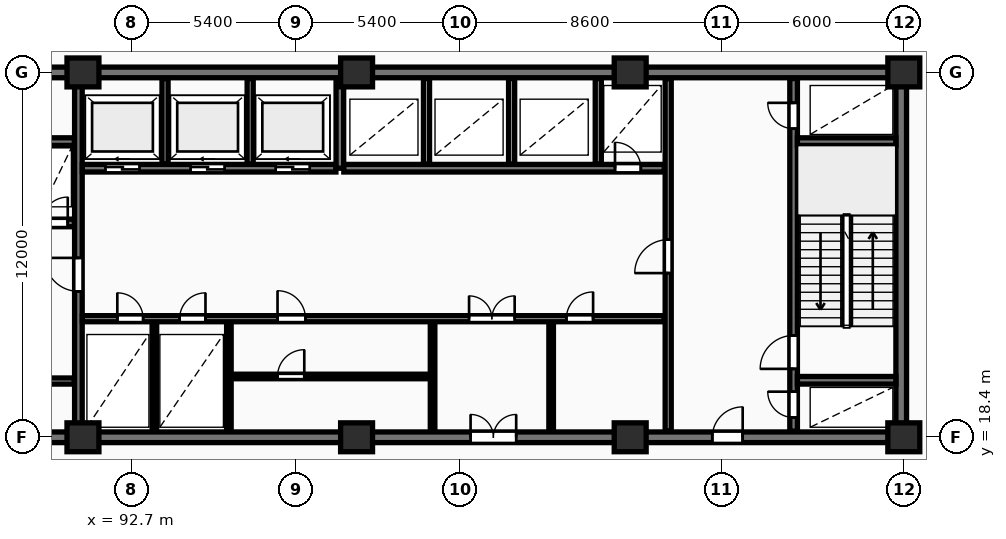
"""IFC4 building model, lengths in metres.
Left out: names, types, materials, properties, quantities, classifications, styles, units other than length and angle.
Written with IfcOpenShell. Run it as: python <this file> out.ifc"""

import sys

from ifc_helpers import new_model, si_unit, direction, frame, frame_2d, origin, origin_2d, place, context, subcontext, project, spatial, rectangle, extrude, element, fill, save


model = new_model("IFC4")
c1 = context("Model", 3, precision=1e-05, world=origin(), true_north=direction((0.0, 1.0)))
c2 = subcontext(c1, "Body", "Model", "MODEL_VIEW")
j1 = project(units=[si_unit("LENGTHUNIT", "METRE"), si_unit("PLANEANGLEUNIT", "RADIAN")], contexts=[c1])
p1 = place(None, origin())
s1 = spatial("IfcSite", under=j1, at=p1, CompositionType="ELEMENT")
p2 = place(p1, origin())
s2 = spatial("IfcBuilding", under=s1, at=p2, CompositionType="ELEMENT")
p3 = place(p2, frame((0.0, 0.0, 19.0)))
s3 = spatial("IfcBuildingStorey", under=s2, at=p3, CompositionType="ELEMENT", Elevation=19.0)
for number, where, z_axis, x_axis in (
    (1, (91.1, 18.4, 0.0), (0.0, 0.0, 1.0), (1.0, 0.0, 0.0)),
    (2, (91.1, 30.4, 0.0), (0.0, 0.0, 1.0), (1.0, 0.0, 0.0)),
    (3, (100.1, 18.4, 0.0), (0.0, 0.0, 1.0), (1.0, 0.0, 0.0)),
    (4, (100.1, 30.4, 0.0), (0.0, 0.0, 1.0), (1.0, 0.0, 0.0)),
    (5, (109.1, 18.4, 0.0), (0.0, 0.0, 1.0), (1.0, 0.0, 0.0)),
    (6, (109.1, 30.4, 0.0), (0.0, 0.0, 1.0), (1.0, 0.0, 0.0)),
    (7, (118.1, 18.4, 0.0), (0.0, 0.0, 1.0), (1.0, 0.0, 0.0)),
    (8, (118.1, 30.4, 0.0), (0.0, 0.0, 1.0), (1.0, 0.0, 0.0)),
):
    element("IfcColumn", number, at=place(p3, frame(where, z_axis=z_axis, x_axis=x_axis)), inside=s3, PredefinedType="COLUMN", context=c2, shape_type="SweptSolid", body=[
        extrude(rectangle(XDim=1.05, YDim=0.95, at=origin_2d()), origin(), (0.0, 0.0, 1.0), 5.0),
    ])
p4 = place(p3, frame((81.925, 30.4, 0.0), z_axis=(0.0, 0.0, 1.0), x_axis=(1.0, 0.0, 0.0)))
e9 = element("IfcWall", 9, at=p4, inside=s3, PredefinedType="SHEAR", context=c2, shape_type="SweptSolid", body=[
    extrude(rectangle(XDim=36.265, YDim=0.35, at=frame_2d((18.132, 0.0))), origin(), (0.0, 0.0, 1.0), 5.0),
])
p5 = place(p3, frame((118.015, 18.575, 0.0), z_axis=(0.0, 0.0, 1.0), x_axis=(0.0, 1.0, 0.0)))
e10 = element("IfcWall", 10, at=p5, inside=s3, PredefinedType="SHEAR", context=c2, shape_type="SweptSolid", body=[
    extrude(rectangle(XDim=11.65, YDim=0.35, at=frame_2d((5.825, 0.0))), origin(), (0.0, 0.0, 1.0), 5.0),
])
p6 = place(p3, frame((81.925, 18.4, 0.0), z_axis=(0.0, 0.0, 1.0), x_axis=(1.0, 0.0, 0.0)))
e11 = element("IfcWall", 11, at=p6, inside=s3, PredefinedType="SHEAR", context=c2, shape_type="SweptSolid", body=[
    extrude(rectangle(XDim=36.265, YDim=0.35, at=frame_2d((18.132, 0.0))), origin(), (0.0, 0.0, 1.0), 5.0),
])
p7 = place(p6, frame((5.675, 0.0, 0.0)))
e12 = element("IfcOpeningElement", 12, at=p7, cuts=e11, PredefinedType="OPENING", context=c2, shape_type="SweptSolid", body=[
    extrude(rectangle(XDim=1.0, YDim=2.15, at=frame_2d((0.5, 1.075))), frame((0.0, 0.185, 0.0), z_axis=(0.0, -1.0, 0.0), x_axis=(1.0, 0.0, 0.0)), (0.0, 0.0, 1.0), 0.37),
])
p8 = place(p6, frame((21.925, 0.0, 0.0)))
e13 = element("IfcOpeningElement", 13, at=p8, cuts=e11, PredefinedType="OPENING", context=c2, shape_type="SweptSolid", body=[
    extrude(rectangle(XDim=1.5, YDim=2.2, at=frame_2d((0.75, 1.1))), frame((0.0, 0.185, 0.0), z_axis=(0.0, -1.0, 0.0), x_axis=(1.0, 0.0, 0.0)), (0.0, 0.0, 1.0), 0.37),
])
p9 = place(p6, frame((29.875, 0.0, 0.0)))
e14 = element("IfcOpeningElement", 14, at=p9, cuts=e11, PredefinedType="OPENING", context=c2, shape_type="SweptSolid", body=[
    extrude(rectangle(XDim=1.0, YDim=2.15, at=frame_2d((0.5, 1.075))), frame((0.0, 0.185, 0.0), z_axis=(0.0, -1.0, 0.0), x_axis=(1.0, 0.0, 0.0)), (0.0, 0.0, 1.0), 0.37),
])
p10 = place(p3, frame((83.0, 28.125, 0.0), z_axis=(0.0, 0.0, 1.0), x_axis=(1.0, 0.0, 0.0)))
e15 = element("IfcWall", 15, at=p10, inside=s3, PredefinedType="SHEAR", context=c2, shape_type="SweptSolid", body=[
    extrude(rectangle(XDim=7.82, YDim=0.25, at=frame_2d((3.91, 0.0))), origin(), (0.0, 0.0, 1.0), 5.0),
])
p11 = place(p3, frame((86.5, 25.45, 0.0), z_axis=(0.0, 0.0, 1.0), x_axis=(1.0, 0.0, 0.0)))
e16 = element("IfcWall", 16, at=p11, inside=s3, PredefinedType="SHEAR", context=c2, shape_type="SweptSolid", body=[
    extrude(rectangle(XDim=4.32, YDim=0.25, at=frame_2d((2.16, 0.0))), origin(), (0.0, 0.0, 1.0), 5.0),
])
p12 = place(p11, frame((1.14, 0.0, 0.0)))
e17 = element("IfcOpeningElement", 17, at=p12, cuts=e16, PredefinedType="OPENING", context=c2, shape_type="SweptSolid", body=[
    extrude(rectangle(XDim=1.12, YDim=2.12, at=frame_2d((0.56, 1.06))), frame((0.0, 0.135, 0.0), z_axis=(0.0, -1.0, 0.0), x_axis=(1.0, 0.0, 0.0)), (0.0, 0.0, 1.0), 0.27),
])
p13 = place(p11, frame((3.25, 0.0, 0.0)))
e18 = element("IfcOpeningElement", 18, at=p13, cuts=e16, PredefinedType="OPENING", context=c2, shape_type="SweptSolid", body=[
    extrude(rectangle(XDim=0.85, YDim=2.05, at=frame_2d((0.425, 1.025))), frame((0.0, 0.135, 0.0), z_axis=(0.0, -1.0, 0.0), x_axis=(1.0, 0.0, 0.0)), (0.0, 0.0, 1.0), 0.27),
])
p14 = place(p3, frame((86.5, 20.25, 0.0), z_axis=(0.0, 0.0, 1.0), x_axis=(1.0, 0.0, 0.0)))
e19 = element("IfcWall", 19, at=p14, inside=s3, PredefinedType="PARTITIONING", context=c2, shape_type="SweptSolid", body=[
    extrude(rectangle(XDim=4.32, YDim=0.2, at=frame_2d((2.16, 0.0))), origin(), (0.0, 0.0, 1.0), 4.68),
])
p15 = place(p14, frame((1.4, 0.0, 0.0)))
e20 = element("IfcOpeningElement", 20, at=p15, cuts=e19, PredefinedType="OPENING", context=c2, shape_type="SweptSolid", body=[
    extrude(rectangle(XDim=1.1, YDim=2.1, at=frame_2d((0.55, 1.05))), frame((0.0, 0.11, 0.0), z_axis=(0.0, -1.0, 0.0), x_axis=(1.0, 0.0, 0.0)), (0.0, 0.0, 1.0), 0.22),
])
p16 = place(p3, frame((90.95, 18.6, 0.0), z_axis=(0.0, 0.0, 1.0), x_axis=(0.0, 1.0, 0.0)))
e21 = element("IfcWall", 21, at=p16, inside=s3, PredefinedType="SHEAR", context=c2, shape_type="SweptSolid", body=[
    extrude(rectangle(XDim=11.6, YDim=0.25, at=frame_2d((5.8, 0.0))), origin(), (0.0, 0.0, 1.0), 5.0),
])
p17 = place(p16, frame((4.6, 0.0, 0.0)))
e22 = element("IfcOpeningElement", 22, at=p17, cuts=e21, PredefinedType="OPENING", context=c2, shape_type="SweptSolid", body=[
    extrude(rectangle(XDim=1.1, YDim=2.1, at=frame_2d((0.55, 1.05))), frame((0.0, 0.135, 0.0), z_axis=(0.0, -1.0, 0.0), x_axis=(1.0, 0.0, 0.0)), (0.0, 0.0, 1.0), 0.27),
])
for number, where, z_axis, x_axis in (
    (23, (93.8, 27.38, 0.0), (0.0, 0.0, 1.0), (0.0, 1.0, 0.0)),
    (24, (96.6, 27.38, 0.0), (0.0, 0.0, 1.0), (0.0, 1.0, 0.0)),
):
    element("IfcWall", number, at=place(p3, frame(where, z_axis=z_axis, x_axis=x_axis)), inside=s3, PredefinedType="PARTITIONING", context=c2, shape_type="SweptSolid", body=[
        extrude(rectangle(XDim=2.82, YDim=0.2, at=frame_2d((1.41, 0.0))), origin(), (0.0, 0.0, 1.0), 4.68),
    ])
p18 = place(p3, frame((91.08, 27.25, 0.0), z_axis=(0.0, 0.0, 1.0), x_axis=(1.0, 0.0, 0.0)))
e25 = element("IfcWall", 25, at=p18, inside=s3, PredefinedType="SHEAR", context=c2, shape_type="SweptSolid", body=[
    extrude(rectangle(XDim=8.34, YDim=0.25, at=frame_2d((4.17, 0.0))), origin(), (0.0, 0.0, 1.0), 5.0),
])
p19 = place(p18, frame((0.76, 0.0, 0.0)))
e26 = element("IfcOpeningElement", 26, at=p19, cuts=e25, PredefinedType="OPENING", context=c2, shape_type="SweptSolid", body=[
    extrude(rectangle(XDim=1.12, YDim=2.12, at=frame_2d((0.56, 1.06))), frame((0.0, 0.135, 0.0), z_axis=(0.0, -1.0, 0.0), x_axis=(1.0, 0.0, 0.0)), (0.0, 0.0, 1.0), 0.27),
])
p20 = place(p18, frame((3.56, 0.0, 0.0)))
e27 = element("IfcOpeningElement", 27, at=p20, cuts=e25, PredefinedType="OPENING", context=c2, shape_type="SweptSolid", body=[
    extrude(rectangle(XDim=1.12, YDim=2.12, at=frame_2d((0.56, 1.06))), frame((0.0, 0.135, 0.0), z_axis=(0.0, -1.0, 0.0), x_axis=(1.0, 0.0, 0.0)), (0.0, 0.0, 1.0), 0.27),
])
p21 = place(p18, frame((6.36, 0.0, 0.0)))
e28 = element("IfcOpeningElement", 28, at=p21, cuts=e25, PredefinedType="OPENING", context=c2, shape_type="SweptSolid", body=[
    extrude(rectangle(XDim=1.12, YDim=2.12, at=frame_2d((0.56, 1.06))), frame((0.0, 0.135, 0.0), z_axis=(0.0, -1.0, 0.0), x_axis=(1.0, 0.0, 0.0)), (0.0, 0.0, 1.0), 0.27),
])
p22 = place(p3, frame((99.55, 27.25, 0.0), z_axis=(0.0, 0.0, 1.0), x_axis=(0.0, 1.0, 0.0)))
e29 = element("IfcWall", 29, at=p22, inside=s3, PredefinedType="SHEAR", context=c2, shape_type="SweptSolid", body=[
    extrude(rectangle(XDim=2.95, YDim=0.25, at=frame_2d((1.475, 0.0))), origin(), (0.0, 0.0, 1.0), 5.0),
])
for number, where, z_axis, x_axis in (
    (30, (102.4, 27.38, 0.0), (0.0, 0.0, 1.0), (0.0, 1.0, 0.0)),
    (31, (105.2, 27.38, 0.0), (0.0, 0.0, 1.0), (0.0, 1.0, 0.0)),
    (32, (108.05, 27.38, 0.0), (0.0, 0.0, 1.0), (0.0, 1.0, 0.0)),
):
    element("IfcWall", number, at=place(p3, frame(where, z_axis=z_axis, x_axis=x_axis)), inside=s3, PredefinedType="PARTITIONING", context=c2, shape_type="SweptSolid", body=[
        extrude(rectangle(XDim=2.82, YDim=0.2, at=frame_2d((1.41, 0.0))), origin(), (0.0, 0.0, 1.0), 4.68),
    ])
p23 = place(p3, frame((99.68, 27.25, 0.0), z_axis=(0.0, 0.0, 1.0), x_axis=(1.0, 0.0, 0.0)))
e33 = element("IfcWall", 33, at=p23, inside=s3, PredefinedType="SHEAR", context=c2, shape_type="SweptSolid", body=[
    extrude(rectangle(XDim=10.54, YDim=0.25, at=frame_2d((5.27, 0.0))), origin(), (0.0, 0.0, 1.0), 5.0),
])
p24 = place(p23, frame((8.92, 0.0, 0.0)))
e34 = element("IfcOpeningElement", 34, at=p24, cuts=e33, PredefinedType="OPENING", context=c2, shape_type="SweptSolid", body=[
    extrude(rectangle(XDim=0.85, YDim=2.05, at=frame_2d((0.425, 1.025))), frame((0.0, 0.135, 0.0), z_axis=(0.0, -1.0, 0.0), x_axis=(1.0, 0.0, 0.0)), (0.0, 0.0, 1.0), 0.27),
])
for number, where, z_axis, x_axis in (
    (35, (93.45, 18.6, 0.0), (0.0, 0.0, 1.0), (0.0, 1.0, 0.0)),
    (36, (95.9, 18.6, 0.0), (0.0, 0.0, 1.0), (0.0, 1.0, 0.0)),
):
    element("IfcWall", number, at=place(p3, frame(where, z_axis=z_axis, x_axis=x_axis)), inside=s3, PredefinedType="PARTITIONING", context=c2, shape_type="SweptSolid", body=[
        extrude(rectangle(XDim=3.6, YDim=0.15, at=frame_2d((1.8, 0.0))), origin(), (0.0, 0.0, 1.0), 4.68),
    ])
p25 = place(p3, frame((95.9, 20.4, 0.0), z_axis=(0.0, 0.0, 1.0), x_axis=(1.0, 0.0, 0.0)))
e37 = element("IfcWall", 37, at=p25, inside=s3, PredefinedType="PARTITIONING", context=c2, shape_type="SweptSolid", body=[
    extrude(rectangle(XDim=6.7, YDim=0.15, at=frame_2d((3.35, 0.0))), origin(), (0.0, 0.0, 1.0), 4.68),
])
p26 = place(p25, frame((1.6, 0.0, 0.0)))
e38 = element("IfcOpeningElement", 38, at=p26, cuts=e37, PredefinedType="OPENING", context=c2, shape_type="SweptSolid", body=[
    extrude(rectangle(XDim=0.88, YDim=2.06, at=frame_2d((0.44, 1.03))), frame((0.0, 0.085, 0.0), z_axis=(0.0, -1.0, 0.0), x_axis=(1.0, 0.0, 0.0)), (0.0, 0.0, 1.0), 0.17),
])
for number, where, z_axis, x_axis in (
    (39, (102.6, 18.6, 0.0), (0.0, 0.0, 1.0), (0.0, 1.0, 0.0)),
    (40, (106.5, 18.6, 0.0), (0.0, 0.0, 1.0), (0.0, 1.0, 0.0)),
):
    element("IfcWall", number, at=place(p3, frame(where, z_axis=z_axis, x_axis=x_axis)), inside=s3, PredefinedType="PARTITIONING", context=c2, shape_type="SweptSolid", body=[
        extrude(rectangle(XDim=3.6, YDim=0.15, at=frame_2d((1.8, 0.0))), origin(), (0.0, 0.0, 1.0), 4.68),
    ])
p27 = place(p3, frame((91.08, 22.3, 0.0), z_axis=(0.0, 0.0, 1.0), x_axis=(1.0, 0.0, 0.0)))
e41 = element("IfcWall", 41, at=p27, inside=s3, PredefinedType="PARTITIONING", context=c2, shape_type="SweptSolid", body=[
    extrude(rectangle(XDim=19.14, YDim=0.2, at=frame_2d((9.57, 0.0))), origin(), (0.0, 0.0, 1.0), 4.68),
])
p28 = place(p27, frame((1.15, 0.0, 0.0)))
e42 = element("IfcOpeningElement", 42, at=p28, cuts=e41, PredefinedType="OPENING", context=c2, shape_type="SweptSolid", body=[
    extrude(rectangle(XDim=0.85, YDim=2.05, at=frame_2d((0.425, 1.025))), frame((0.0, 0.11, 0.0), z_axis=(0.0, -1.0, 0.0), x_axis=(1.0, 0.0, 0.0)), (0.0, 0.0, 1.0), 0.22),
])
p29 = place(p27, frame((3.2, 0.0, 0.0)))
e43 = element("IfcOpeningElement", 43, at=p29, cuts=e41, PredefinedType="OPENING", context=c2, shape_type="SweptSolid", body=[
    extrude(rectangle(XDim=0.85, YDim=2.05, at=frame_2d((0.425, 1.025))), frame((0.0, 0.11, 0.0), z_axis=(0.0, -1.0, 0.0), x_axis=(1.0, 0.0, 0.0)), (0.0, 0.0, 1.0), 0.22),
])
p30 = place(p27, frame((12.72, 0.0, 0.0)))
e44 = element("IfcOpeningElement", 44, at=p30, cuts=e41, PredefinedType="OPENING", context=c2, shape_type="SweptSolid", body=[
    extrude(rectangle(XDim=1.5, YDim=2.2, at=frame_2d((0.75, 1.1))), frame((0.0, 0.11, 0.0), z_axis=(0.0, -1.0, 0.0), x_axis=(1.0, 0.0, 0.0)), (0.0, 0.0, 1.0), 0.22),
])
p31 = place(p27, frame((6.42, 0.0, 0.0)))
e45 = element("IfcOpeningElement", 45, at=p31, cuts=e41, PredefinedType="OPENING", context=c2, shape_type="SweptSolid", body=[
    extrude(rectangle(XDim=0.92, YDim=2.08, at=frame_2d((0.46, 1.04))), frame((0.0, 0.11, 0.0), z_axis=(0.0, -1.0, 0.0), x_axis=(1.0, 0.0, 0.0)), (0.0, 0.0, 1.0), 0.22),
])
p32 = place(p27, frame((15.92, 0.0, 0.0)))
e46 = element("IfcOpeningElement", 46, at=p32, cuts=e41, PredefinedType="OPENING", context=c2, shape_type="SweptSolid", body=[
    extrude(rectangle(XDim=0.88, YDim=2.06, at=frame_2d((0.44, 1.03))), frame((0.0, 0.11, 0.0), z_axis=(0.0, -1.0, 0.0), x_axis=(1.0, 0.0, 0.0)), (0.0, 0.0, 1.0), 0.22),
])
p33 = place(p3, frame((110.35, 18.6, 0.0), z_axis=(0.0, 0.0, 1.0), x_axis=(0.0, 1.0, 0.0)))
e47 = element("IfcWall", 47, at=p33, inside=s3, PredefinedType="PARTITIONING", context=c2, shape_type="SweptSolid", body=[
    extrude(rectangle(XDim=11.6, YDim=0.2, at=frame_2d((5.8, 0.0))), origin(), (0.0, 0.0, 1.0), 4.68),
])
p34 = place(p33, frame((5.2, 0.0, 0.0)))
e48 = element("IfcOpeningElement", 48, at=p34, cuts=e47, PredefinedType="OPENING", context=c2, shape_type="SweptSolid", body=[
    extrude(rectangle(XDim=1.1, YDim=2.15, at=frame_2d((0.55, 1.075))), frame((0.0, 0.11, 0.0), z_axis=(0.0, -1.0, 0.0), x_axis=(1.0, 0.0, 0.0)), (0.0, 0.0, 1.0), 0.22),
])
p35 = place(p3, frame((114.475, 18.6, 0.0), z_axis=(0.0, 0.0, 1.0), x_axis=(0.0, 1.0, 0.0)))
e49 = element("IfcWall", 49, at=p35, inside=s3, PredefinedType="SHEAR", context=c2, shape_type="SweptSolid", body=[
    extrude(rectangle(XDim=11.6, YDim=0.25, at=frame_2d((5.8, 0.0))), origin(), (0.0, 0.0, 1.0), 5.0),
])
p36 = place(p35, frame((0.45, 0.0, 0.0)))
e50 = element("IfcOpeningElement", 50, at=p36, cuts=e49, PredefinedType="OPENING", context=c2, shape_type="SweptSolid", body=[
    extrude(rectangle(XDim=0.85, YDim=2.05, at=frame_2d((0.425, 1.025))), frame((0.0, 0.135, 0.0), z_axis=(0.0, -1.0, 0.0), x_axis=(1.0, 0.0, 0.0)), (0.0, 0.0, 1.0), 0.27),
])
p37 = place(p35, frame((2.05, 0.0, 0.0)))
e51 = element("IfcOpeningElement", 51, at=p37, cuts=e49, PredefinedType="OPENING", context=c2, shape_type="SweptSolid", body=[
    extrude(rectangle(XDim=1.1, YDim=2.1, at=frame_2d((0.55, 1.05))), frame((0.0, 0.135, 0.0), z_axis=(0.0, -1.0, 0.0), x_axis=(1.0, 0.0, 0.0)), (0.0, 0.0, 1.0), 0.27),
])
p38 = place(p35, frame((9.95, 0.0, 0.0)))
e52 = element("IfcOpeningElement", 52, at=p38, cuts=e49, PredefinedType="OPENING", context=c2, shape_type="SweptSolid", body=[
    extrude(rectangle(XDim=0.85, YDim=2.05, at=frame_2d((0.425, 1.025))), frame((0.0, 0.135, 0.0), z_axis=(0.0, -1.0, 0.0), x_axis=(1.0, 0.0, 0.0)), (0.0, 0.0, 1.0), 0.27),
])
for number, where, z_axis, x_axis in (
    (53, (114.6, 20.275, 0.0), (0.0, 0.0, 1.0), (1.0, 0.0, 0.0)),
    (54, (114.6, 28.125, 0.0), (0.0, 0.0, 1.0), (1.0, 0.0, 0.0)),
):
    element("IfcWall", number, at=place(p3, frame(where, z_axis=z_axis, x_axis=x_axis)), inside=s3, PredefinedType="SHEAR", context=c2, shape_type="SweptSolid", body=[
        extrude(rectangle(XDim=3.24, YDim=0.25, at=frame_2d((1.62, 0.0))), origin(), (0.0, 0.0, 1.0), 5.0),
    ])
p39 = place(p8, origin())
e55 = element("IfcDoor", 55, at=p39, inside=s3, OperationType="DOUBLE_DOOR_SINGLE_SWING", PredefinedType="DOOR", context=c2, shape_type="SweptSolid", body=[
    extrude(rectangle(XDim=1.5, YDim=2.2, at=frame_2d((0.75, 1.1))), frame((0.0, 0.025, 0.0), z_axis=(0.0, -1.0, 0.0), x_axis=(1.0, 0.0, 0.0)), (0.0, 0.0, 1.0), 0.05),
])
fill(e13, e55)
p40 = place(p9, origin())
e56 = element("IfcDoor", 56, at=p40, inside=s3, OperationType="SINGLE_SWING_RIGHT", PredefinedType="DOOR", context=c2, shape_type="SweptSolid", body=[
    extrude(rectangle(XDim=1.0, YDim=2.15, at=frame_2d((0.5, 1.075))), frame((0.0, 0.025, 0.0), z_axis=(0.0, -1.0, 0.0), x_axis=(1.0, 0.0, 0.0)), (0.0, 0.0, 1.0), 0.05),
])
fill(e14, e56)
p41 = place(p13, origin())
e57 = element("IfcDoor", 57, at=p41, inside=s3, OperationType="SINGLE_SWING_RIGHT", PredefinedType="DOOR", context=c2, shape_type="SweptSolid", body=[
    extrude(rectangle(XDim=0.85, YDim=2.05, at=frame_2d((0.425, 1.025))), frame((0.0, 0.025, 0.0), z_axis=(0.0, -1.0, 0.0), x_axis=(1.0, 0.0, 0.0)), (0.0, 0.0, 1.0), 0.05),
])
fill(e18, e57)
p42 = place(p17, origin())
e58 = element("IfcDoor", 58, at=p42, inside=s3, OperationType="SINGLE_SWING_RIGHT", PredefinedType="DOOR", context=c2, shape_type="SweptSolid", body=[
    extrude(rectangle(XDim=1.1, YDim=2.1, at=frame_2d((0.55, 1.05))), frame((0.0, 0.025, 0.0), z_axis=(0.0, -1.0, 0.0), x_axis=(1.0, 0.0, 0.0)), (0.0, 0.0, 1.0), 0.05),
])
fill(e22, e58)
p43 = place(p19, origin())
e59 = element("IfcDoor", 59, at=p43, inside=s3, OperationType="SLIDING_TO_LEFT", PredefinedType="DOOR", context=c2, shape_type="SweptSolid", body=[
    extrude(rectangle(XDim=1.12, YDim=2.12, at=frame_2d((0.56, 1.06))), frame((0.0, 0.025, 0.0), z_axis=(0.0, -1.0, 0.0), x_axis=(1.0, 0.0, 0.0)), (0.0, 0.0, 1.0), 0.05),
])
fill(e26, e59)
p44 = place(p20, origin())
e60 = element("IfcDoor", 60, at=p44, inside=s3, OperationType="SLIDING_TO_LEFT", PredefinedType="DOOR", context=c2, shape_type="SweptSolid", body=[
    extrude(rectangle(XDim=1.12, YDim=2.12, at=frame_2d((0.56, 1.06))), frame((0.0, 0.025, 0.0), z_axis=(0.0, -1.0, 0.0), x_axis=(1.0, 0.0, 0.0)), (0.0, 0.0, 1.0), 0.05),
])
fill(e27, e60)
p45 = place(p21, origin())
e61 = element("IfcDoor", 61, at=p45, inside=s3, OperationType="SLIDING_TO_LEFT", PredefinedType="DOOR", context=c2, shape_type="SweptSolid", body=[
    extrude(rectangle(XDim=1.12, YDim=2.12, at=frame_2d((0.56, 1.06))), frame((0.0, 0.025, 0.0), z_axis=(0.0, -1.0, 0.0), x_axis=(1.0, 0.0, 0.0)), (0.0, 0.0, 1.0), 0.05),
])
fill(e28, e61)
p46 = place(p24, origin())
e62 = element("IfcDoor", 62, at=p46, inside=s3, OperationType="SINGLE_SWING_LEFT", PredefinedType="DOOR", context=c2, shape_type="SweptSolid", body=[
    extrude(rectangle(XDim=0.85, YDim=2.05, at=frame_2d((0.425, 1.025))), frame((0.0, 0.025, 0.0), z_axis=(0.0, -1.0, 0.0), x_axis=(1.0, 0.0, 0.0)), (0.0, 0.0, 1.0), 0.05),
])
fill(e34, e62)
p47 = place(p26, origin())
e63 = element("IfcDoor", 63, at=p47, inside=s3, OperationType="SINGLE_SWING_RIGHT", PredefinedType="DOOR", context=c2, shape_type="SweptSolid", body=[
    extrude(rectangle(XDim=0.88, YDim=2.06, at=frame_2d((0.44, 1.03))), frame((0.0, 0.025, 0.0), z_axis=(0.0, -1.0, 0.0), x_axis=(1.0, 0.0, 0.0)), (0.0, 0.0, 1.0), 0.05),
])
fill(e38, e63)
p48 = place(p28, origin())
e64 = element("IfcDoor", 64, at=p48, inside=s3, OperationType="SINGLE_SWING_LEFT", PredefinedType="DOOR", context=c2, shape_type="SweptSolid", body=[
    extrude(rectangle(XDim=0.85, YDim=2.05, at=frame_2d((0.425, 1.025))), frame((0.0, 0.025, 0.0), z_axis=(0.0, -1.0, 0.0), x_axis=(1.0, 0.0, 0.0)), (0.0, 0.0, 1.0), 0.05),
])
fill(e42, e64)
p49 = place(p29, origin())
e65 = element("IfcDoor", 65, at=p49, inside=s3, OperationType="SINGLE_SWING_RIGHT", PredefinedType="DOOR", context=c2, shape_type="SweptSolid", body=[
    extrude(rectangle(XDim=0.85, YDim=2.05, at=frame_2d((0.425, 1.025))), frame((0.0, 0.025, 0.0), z_axis=(0.0, -1.0, 0.0), x_axis=(1.0, 0.0, 0.0)), (0.0, 0.0, 1.0), 0.05),
])
fill(e43, e65)
p50 = place(p30, origin())
e66 = element("IfcDoor", 66, at=p50, inside=s3, OperationType="DOUBLE_DOOR_SINGLE_SWING", PredefinedType="DOOR", context=c2, shape_type="SweptSolid", body=[
    extrude(rectangle(XDim=1.5, YDim=2.2, at=frame_2d((0.75, 1.1))), frame((0.0, 0.025, 0.0), z_axis=(0.0, -1.0, 0.0), x_axis=(1.0, 0.0, 0.0)), (0.0, 0.0, 1.0), 0.05),
])
fill(e44, e66)
p51 = place(p31, origin())
e67 = element("IfcDoor", 67, at=p51, inside=s3, OperationType="SINGLE_SWING_LEFT", PredefinedType="DOOR", context=c2, shape_type="SweptSolid", body=[
    extrude(rectangle(XDim=0.92, YDim=2.08, at=frame_2d((0.46, 1.04))), frame((0.0, 0.025, 0.0), z_axis=(0.0, -1.0, 0.0), x_axis=(1.0, 0.0, 0.0)), (0.0, 0.0, 1.0), 0.05),
])
fill(e45, e67)
p52 = place(p32, origin())
e68 = element("IfcDoor", 68, at=p52, inside=s3, OperationType="SINGLE_SWING_RIGHT", PredefinedType="DOOR", context=c2, shape_type="SweptSolid", body=[
    extrude(rectangle(XDim=0.88, YDim=2.06, at=frame_2d((0.44, 1.03))), frame((0.0, 0.025, 0.0), z_axis=(0.0, -1.0, 0.0), x_axis=(1.0, 0.0, 0.0)), (0.0, 0.0, 1.0), 0.05),
])
fill(e46, e68)
p53 = place(p34, origin())
e69 = element("IfcDoor", 69, at=p53, inside=s3, OperationType="SINGLE_SWING_LEFT", PredefinedType="DOOR", context=c2, shape_type="SweptSolid", body=[
    extrude(rectangle(XDim=1.1, YDim=2.15, at=frame_2d((0.55, 1.075))), frame((0.0, 0.025, 0.0), z_axis=(0.0, -1.0, 0.0), x_axis=(1.0, 0.0, 0.0)), (0.0, 0.0, 1.0), 0.05),
])
fill(e48, e69)
p54 = place(p36, origin())
e70 = element("IfcDoor", 70, at=p54, inside=s3, OperationType="SINGLE_SWING_RIGHT", PredefinedType="DOOR", context=c2, shape_type="SweptSolid", body=[
    extrude(rectangle(XDim=0.85, YDim=2.05, at=frame_2d((0.425, 1.025))), frame((0.0, 0.025, 0.0), z_axis=(0.0, -1.0, 0.0), x_axis=(1.0, 0.0, 0.0)), (0.0, 0.0, 1.0), 0.05),
])
fill(e50, e70)
p55 = place(p37, origin())
e71 = element("IfcDoor", 71, at=p55, inside=s3, OperationType="SINGLE_SWING_LEFT", PredefinedType="DOOR", context=c2, shape_type="SweptSolid", body=[
    extrude(rectangle(XDim=1.1, YDim=2.1, at=frame_2d((0.55, 1.05))), frame((0.0, 0.025, 0.0), z_axis=(0.0, -1.0, 0.0), x_axis=(1.0, 0.0, 0.0)), (0.0, 0.0, 1.0), 0.05),
])
fill(e51, e71)
p56 = place(p38, origin())
e72 = element("IfcDoor", 72, at=p56, inside=s3, OperationType="SINGLE_SWING_RIGHT", PredefinedType="DOOR", context=c2, shape_type="SweptSolid", body=[
    extrude(rectangle(XDim=0.85, YDim=2.05, at=frame_2d((0.425, 1.025))), frame((0.0, 0.025, 0.0), z_axis=(0.0, -1.0, 0.0), x_axis=(1.0, 0.0, 0.0)), (0.0, 0.0, 1.0), 0.05),
])
fill(e52, e72)
save(model, sys.argv[1])
